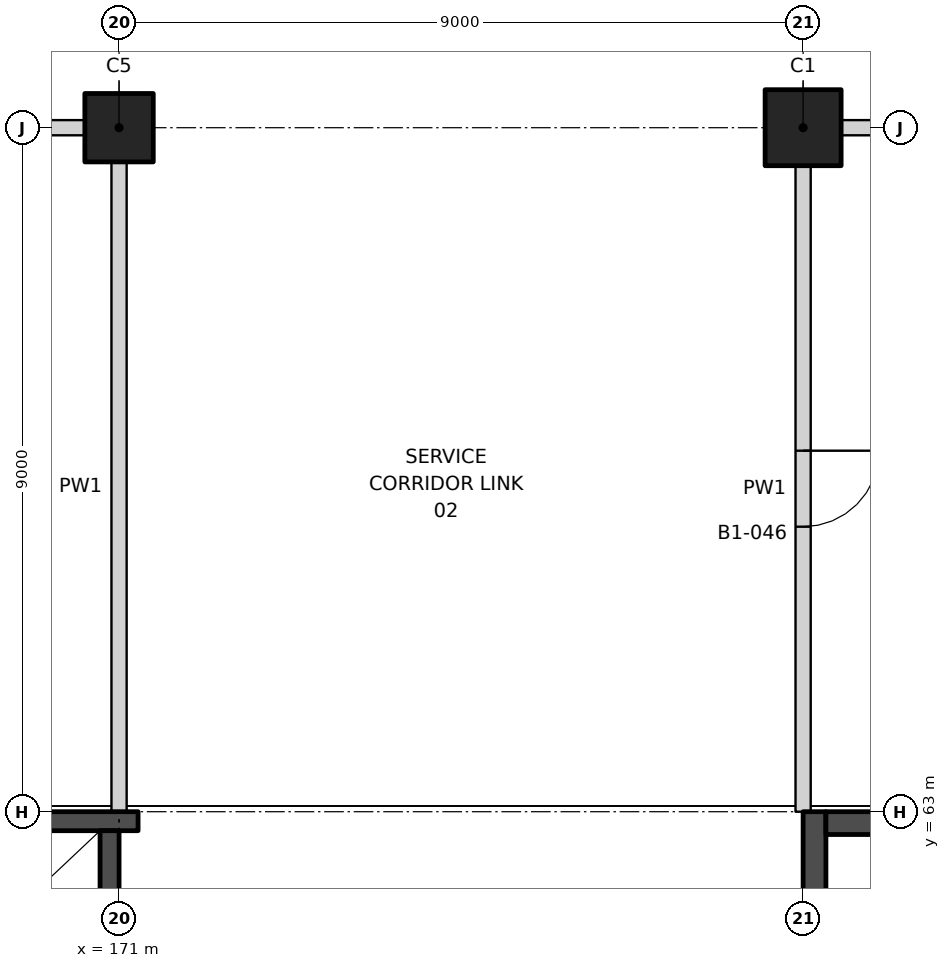
"""IFC4 building model, lengths in metres.
Left out: names, types, materials, properties, quantities, classifications, styles, units other than length and angle.
Written with IfcOpenShell. Run it as: python <this file> out.ifc"""

import sys

from ifc_helpers import new_model, si_unit, direction, frame, frame_2d, origin, origin_2d, place, context, subcontext, project, spatial, rectangle, extrude, element, fill, save


model = new_model("IFC4")
c1 = context("Model", 3, precision=1e-05, world=origin(), true_north=direction((0.0, 1.0)))
c2 = subcontext(c1, "Body", "Model", "MODEL_VIEW")
j1 = project(units=[si_unit("LENGTHUNIT", "METRE"), si_unit("PLANEANGLEUNIT", "RADIAN")], contexts=[c1])
p1 = place(None, origin())
s1 = spatial("IfcSite", under=j1, at=p1, CompositionType="ELEMENT")
p2 = place(p1, origin())
s2 = spatial("IfcBuilding", under=s1, at=p2, CompositionType="ELEMENT")
p3 = place(p2, frame((0.0, 0.0, -6.0)))
s3 = spatial("IfcBuildingStorey", under=s2, at=p3, CompositionType="ELEMENT", Elevation=-6.0)
p4 = place(p3, frame((171.0, 72.0, 0.0), z_axis=(0.0, 0.0, 1.0), x_axis=(1.0, 0.0, 0.0)))
e1 = element("IfcColumn", 1, at=p4, inside=s3, PredefinedType="COLUMN", context=c2, shape_type="SweptSolid", body=[
    extrude(rectangle(XDim=0.9, YDim=0.9, at=origin_2d()), origin(), (0.0, 0.0, 1.0), 6.0),
])
p5 = place(p3, frame((180.0, 72.0, 0.0), z_axis=(0.0, 0.0, 1.0), x_axis=(1.0, 0.0, 0.0)))
e2 = element("IfcColumn", 2, at=p5, inside=s3, PredefinedType="COLUMN", context=c2, shape_type="SweptSolid", body=[
    extrude(rectangle(XDim=1.0, YDim=1.0, at=origin_2d()), origin(), (0.0, 0.0, 1.0), 6.0),
])
p6 = place(p3, frame((164.25, 72.0, 0.0), z_axis=(0.0, 0.0, 1.0), x_axis=(1.0, 0.0, 0.0)))
e3 = element("IfcWall", 3, at=p6, inside=s3, PredefinedType="PARTITIONING", context=c2, shape_type="SweptSolid", body=[
    extrude(rectangle(XDim=6.3, YDim=0.2, at=frame_2d((3.15, 0.0))), origin(), (0.0, 0.0, 1.0), 4.85),
])
p7 = place(p6, frame((4.25, 0.0, 0.0)))
e4 = element("IfcOpeningElement", 4, at=p7, cuts=e3, PredefinedType="OPENING", context=c2, shape_type="SweptSolid", body=[
    extrude(rectangle(XDim=1.0, YDim=2.1, at=frame_2d((0.5, 1.05))), frame((0.0, 0.11, 0.0), z_axis=(0.0, -1.0, 0.0), x_axis=(1.0, 0.0, 0.0)), (0.0, 0.0, 1.0), 0.22),
])
p8 = place(p3, frame((180.5, 72.0, 0.0), z_axis=(0.0, 0.0, 1.0), x_axis=(1.0, 0.0, 0.0)))
e5 = element("IfcWall", 5, at=p8, inside=s3, PredefinedType="PARTITIONING", context=c2, shape_type="SweptSolid", body=[
    extrude(rectangle(XDim=8.3, YDim=0.2, at=frame_2d((4.15, 0.0))), origin(), (0.0, 0.0, 1.0), 4.65),
])
p9 = place(p3, frame((171.0, 63.0, 0.0), z_axis=(0.0, 0.0, 1.0), x_axis=(0.0, 1.0, 0.0)))
e6 = element("IfcWall", 6, at=p9, inside=s3, PredefinedType="PARTITIONING", context=c2, shape_type="SweptSolid", body=[
    extrude(rectangle(XDim=8.55, YDim=0.2, at=frame_2d((4.275, 0.0))), origin(), (0.0, 0.0, 1.0), 4.55),
])
p10 = place(p3, frame((180.0, 63.0, 0.0), z_axis=(0.0, 0.0, 1.0), x_axis=(0.0, 1.0, 0.0)))
e7 = element("IfcWall", 7, at=p10, inside=s3, PredefinedType="PARTITIONING", context=c2, shape_type="SweptSolid", body=[
    extrude(rectangle(XDim=8.5, YDim=0.2, at=frame_2d((4.25, 0.0))), origin(), (0.0, 0.0, 1.0), 4.55),
])
p11 = place(p10, frame((3.75, 0.0, 0.0)))
e8 = element("IfcOpeningElement", 8, at=p11, cuts=e7, PredefinedType="OPENING", context=c2, shape_type="SweptSolid", body=[
    extrude(rectangle(XDim=1.0, YDim=2.1, at=frame_2d((0.5, 1.05))), frame((0.0, 0.11, 0.0), z_axis=(0.0, -1.0, 0.0), x_axis=(1.0, 0.0, 0.0)), (0.0, 0.0, 1.0), 0.22),
])
p12 = place(p3, frame((180.15, 63.0, 0.0), z_axis=(0.0, 0.0, 1.0), x_axis=(0.0, -1.0, 0.0)))
e9 = element("IfcWall", 9, at=p12, inside=s3, PredefinedType="SHEAR", context=c2, shape_type="SweptSolid", body=[
    extrude(rectangle(XDim=18.0, YDim=0.3, at=frame_2d((9.0, 0.0))), origin(), (0.0, 0.0, 1.0), 6.0),
])
p13 = place(p12, frame((1.5, 0.0, 0.0)))
e10 = element("IfcOpeningElement", 10, at=p13, cuts=e9, PredefinedType="OPENING", context=c2, shape_type="SweptSolid", body=[
    extrude(rectangle(XDim=1.2, YDim=2.1, at=frame_2d((0.6, 1.05))), frame((0.0, 0.16, 0.0), z_axis=(0.0, -1.0, 0.0), x_axis=(1.0, 0.0, 0.0)), (0.0, 0.0, 1.0), 0.32),
])
p14 = place(p3, frame((180.3, 62.85, 0.0), z_axis=(0.0, 0.0, 1.0), x_axis=(1.0, 0.0, 0.0)))
e11 = element("IfcWall", 11, at=p14, inside=s3, PredefinedType="SHEAR", context=c2, shape_type="SweptSolid", body=[
    extrude(rectangle(XDim=8.4, YDim=0.3, at=frame_2d((4.2, 0.0))), origin(), (0.0, 0.0, 1.0), 6.0),
])
p15 = place(p3, frame((162.0, 62.875, -1.0), z_axis=(0.0, 0.0, 1.0), x_axis=(1.0, 0.0, 0.0)))
e12 = element("IfcWall", 12, at=p15, inside=s3, PredefinedType="SHEAR", context=c2, shape_type="SweptSolid", body=[
    extrude(rectangle(XDim=9.25, YDim=0.25, at=frame_2d((4.625, 0.0))), origin(), (0.0, 0.0, 1.0), 7.0),
])
p16 = place(p3, frame((170.875, 60.25, -1.0), z_axis=(0.0, 0.0, 1.0), x_axis=(0.0, 1.0, 0.0)))
e13 = element("IfcWall", 13, at=p16, inside=s3, PredefinedType="SHEAR", context=c2, shape_type="SweptSolid", body=[
    extrude(rectangle(XDim=2.5, YDim=0.25, at=frame_2d((1.25, 0.0))), origin(), (0.0, 0.0, 1.0), 7.0),
])
p17 = place(p11, frame((1.0, 0.0, 0.0), z_axis=(0.0, 0.0, 1.0), x_axis=(-1.0, 0.0, 0.0)))
e14 = element("IfcDoor", 14, at=p17, inside=s3, OperationType="SINGLE_SWING_LEFT", PredefinedType="DOOR", context=c2, shape_type="SweptSolid", body=[
    extrude(rectangle(XDim=1.0, YDim=2.1, at=frame_2d((0.5, 1.05))), frame((0.0, 0.025, 0.0), z_axis=(0.0, -1.0, 0.0), x_axis=(1.0, 0.0, 0.0)), (0.0, 0.0, 1.0), 0.05),
])
fill(e8, e14)
save(model, sys.argv[1])
